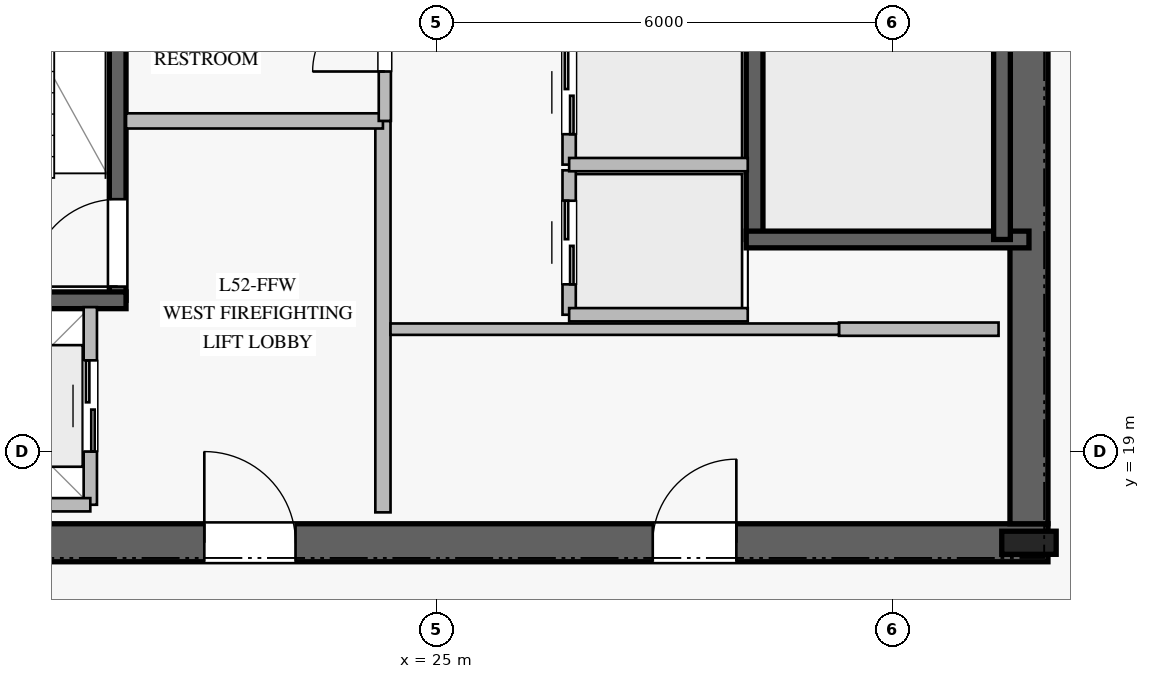
"""IFC4 building model, lengths in metres.
Left out: names, types, materials, properties, quantities, classifications, styles, units other than length and angle.
Written with IfcOpenShell. Run it as: python <this file> out.ifc"""

import sys

from ifc_helpers import new_model, si_unit, direction, frame, frame_2d, origin, origin_2d, place, context, subcontext, project, spatial, rectangle, i_section, extrude, element, fill, save


model = new_model("IFC4")
c1 = context("Model", 3, precision=1e-05, world=origin(), true_north=direction((0.0, 1.0)))
c2 = subcontext(c1, "Body", "Model", "MODEL_VIEW")
j1 = project(units=[si_unit("LENGTHUNIT", "METRE"), si_unit("PLANEANGLEUNIT", "RADIAN")], contexts=[c1])
p1 = place(None, origin())
s1 = spatial("IfcSite", under=j1, at=p1, CompositionType="ELEMENT")
p2 = place(p1, origin())
s2 = spatial("IfcBuilding", under=s1, at=p2, CompositionType="ELEMENT")
p3 = place(p2, frame((0.0, 0.0, 216.8)))
s3 = spatial("IfcBuildingStorey", under=s2, at=p3, CompositionType="ELEMENT", Elevation=216.8)
p4 = place(p3, frame((16.95, 17.8, 0.0), z_axis=(0.0, 0.0, 1.0), x_axis=(1.0, 0.0, 0.0)))
e1 = element("IfcWall", 1, at=p4, inside=s3, PredefinedType="SHEAR", context=c2, shape_type="SweptSolid", body=[
    extrude(rectangle(XDim=16.1, YDim=0.5, at=frame_2d((8.05, 0.0))), origin(), (0.0, 0.0, 1.0), 3.78),
])
p5 = place(p4, frame((5.0, 0.0, 0.0)))
e2 = element("IfcOpeningElement", 2, at=p5, cuts=e1, PredefinedType="OPENING", context=c2, shape_type="SweptSolid", body=[
    extrude(rectangle(XDim=1.2, YDim=2.25, at=frame_2d((0.6, 1.125))), frame((0.0, 0.26, 0.0), z_axis=(0.0, -1.0, 0.0), x_axis=(1.0, 0.0, 0.0)), (0.0, 0.0, 1.0), 0.52),
])
p6 = place(p4, frame((10.9, 0.0, 0.0)))
e3 = element("IfcOpeningElement", 3, at=p6, cuts=e1, PredefinedType="OPENING", context=c2, shape_type="SweptSolid", body=[
    extrude(rectangle(XDim=1.1, YDim=2.2, at=frame_2d((0.55, 1.1))), frame((0.0, 0.26, 0.0), z_axis=(0.0, -1.0, 0.0), x_axis=(1.0, 0.0, 0.0)), (0.0, 0.0, 1.0), 0.52),
])
p7 = place(p3, frame((32.8, 18.05, 0.0), z_axis=(0.0, 0.0, 1.0), x_axis=(0.0, 1.0, 0.0)))
e4 = element("IfcWall", 4, at=p7, inside=s3, PredefinedType="SHEAR", context=c2, shape_type="SweptSolid", body=[
    extrude(rectangle(XDim=13.9, YDim=0.5, at=frame_2d((6.95, 0.0))), origin(), (0.0, 0.0, 1.0), 3.78),
])
p8 = place(p3, frame((32.8, 17.8, 0.0), z_axis=(0.0, 0.0, 1.0), x_axis=(1.0, 0.0, 0.0)))
e5 = element("IfcColumn", 5, at=p8, inside=s3, PredefinedType="COLUMN", context=c2, shape_type="SweptSolid", body=[
    extrude(i_section(OverallWidth=0.304, OverallDepth=0.716, WebThickness=0.021, FlangeThickness=0.04, at=origin_2d()), origin(), (0.0, 0.0, 1.0), 4.0),
])
p9 = place(p3, frame((20.81, 20.99, 0.0), z_axis=(0.0, 0.0, 1.0), x_axis=(0.0, 1.0, 0.0)))
e6 = element("IfcWall", 6, at=p9, inside=s3, PredefinedType="SOLIDWALL", context=c2, shape_type="SweptSolid", body=[
    extrude(rectangle(XDim=7.22, YDim=0.22, at=frame_2d((3.61, 0.0))), origin(), (0.0, 0.0, 1.0), 3.78),
])
p10 = place(p9, frame((0.18, 0.0, 0.0)))
e7 = element("IfcOpeningElement", 7, at=p10, cuts=e6, PredefinedType="OPENING", context=c2, shape_type="SweptSolid", body=[
    extrude(rectangle(XDim=1.15, YDim=2.2, at=frame_2d((0.575, 1.1))), frame((0.0, 0.12, 0.0), z_axis=(0.0, -1.0, 0.0), x_axis=(1.0, 0.0, 0.0)), (0.0, 0.0, 1.0), 0.24),
])
p11 = place(p3, frame((17.2, 20.99, 0.0), z_axis=(0.0, 0.0, 1.0), x_axis=(1.0, 0.0, 0.0)))
e8 = element("IfcWall", 8, at=p11, inside=s3, PredefinedType="SOLIDWALL", context=c2, shape_type="SweptSolid", body=[
    extrude(rectangle(XDim=3.72, YDim=0.22, at=frame_2d((1.86, 0.0))), origin(), (0.0, 0.0, 1.0), 3.78),
])
p12 = place(p3, frame((29.19, 21.79, 0.0), z_axis=(0.0, 0.0, 1.0), x_axis=(0.0, 1.0, 0.0)))
e9 = element("IfcWall", 9, at=p12, inside=s3, PredefinedType="SOLIDWALL", context=c2, shape_type="SweptSolid", body=[
    extrude(rectangle(XDim=7.22, YDim=0.22, at=frame_2d((3.61, 0.0))), origin(), (0.0, 0.0, 1.0), 3.78),
])
p13 = place(p12, frame((5.88, 0.0, 0.0)))
e10 = element("IfcOpeningElement", 10, at=p13, cuts=e9, PredefinedType="OPENING", context=c2, shape_type="SweptSolid", body=[
    extrude(rectangle(XDim=1.15, YDim=2.2, at=frame_2d((0.575, 1.1))), frame((0.0, 0.12, 0.0), z_axis=(0.0, -1.0, 0.0), x_axis=(1.0, 0.0, 0.0)), (0.0, 0.0, 1.0), 0.24),
])
p14 = place(p3, frame((29.08, 21.79, 0.0), z_axis=(0.0, 0.0, 1.0), x_axis=(1.0, 0.0, 0.0)))
e11 = element("IfcWall", 11, at=p14, inside=s3, PredefinedType="SOLIDWALL", context=c2, shape_type="SweptSolid", body=[
    extrude(rectangle(XDim=3.72, YDim=0.22, at=frame_2d((1.86, 0.0))), origin(), (0.0, 0.0, 1.0), 3.78),
])
p15 = place(p3, frame((32.445, 29.01, 0.0), z_axis=(0.0, 0.0, 1.0), x_axis=(0.0, -1.0, 0.0)))
e12 = element("IfcWall", 12, at=p15, inside=s3, PredefinedType="SOLIDWALL", context=c2, shape_type="SweptSolid", body=[
    extrude(rectangle(XDim=7.22, YDim=0.22, at=frame_2d((3.61, 0.0))), origin(), (0.0, 0.0, 1.0), 3.78),
])
p16 = place(p3, frame((24.3, 18.2, 0.0), z_axis=(0.0, 0.0, 1.0), x_axis=(0.0, 1.0, 0.0)))
e13 = element("IfcWall", 13, at=p16, inside=s3, PredefinedType="PARTITIONING", context=c2, shape_type="SweptSolid", body=[
    extrude(rectangle(XDim=5.15, YDim=0.2, at=frame_2d((2.575, 0.0))), origin(), (0.0, 0.0, 1.0), 3.78),
])
p17 = place(p3, frame((20.92, 23.35, 0.0), z_axis=(0.0, 0.0, 1.0), x_axis=(1.0, 0.0, 0.0)))
e14 = element("IfcWall", 14, at=p17, inside=s3, PredefinedType="PARTITIONING", context=c2, shape_type="SweptSolid", body=[
    extrude(rectangle(XDim=3.38, YDim=0.2, at=frame_2d((1.69, 0.0))), origin(), (0.0, 0.0, 1.0), 3.78),
])
p18 = place(p3, frame((24.325, 23.35, 0.0), z_axis=(0.0, 0.0, 1.0), x_axis=(0.0, 1.0, 0.0)))
e15 = element("IfcWall", 15, at=p18, inside=s3, PredefinedType="PLUMBINGWALL", context=c2, shape_type="SweptSolid", body=[
    extrude(rectangle(XDim=4.93, YDim=0.16, at=frame_2d((2.465, 0.0))), origin(), (0.0, 0.0, 1.0), 3.78),
])
p19 = place(p18, frame((0.65, 0.0, 0.0)))
e16 = element("IfcOpeningElement", 16, at=p19, cuts=e15, PredefinedType="OPENING", context=c2, shape_type="SweptSolid", body=[
    extrude(rectangle(XDim=0.95, YDim=2.1, at=frame_2d((0.475, 1.05))), frame((0.0, 0.09, 0.0), z_axis=(0.0, -1.0, 0.0), x_axis=(1.0, 0.0, 0.0)), (0.0, 0.0, 1.0), 0.18),
])
p20 = place(p18, frame((3.11, 0.0, 0.0)))
e17 = element("IfcOpeningElement", 17, at=p20, cuts=e15, PredefinedType="OPENING", context=c2, shape_type="SweptSolid", body=[
    extrude(rectangle(XDim=0.9, YDim=2.1, at=frame_2d((0.45, 1.05))), frame((0.0, 0.09, 0.0), z_axis=(0.0, -1.0, 0.0), x_axis=(1.0, 0.0, 0.0)), (0.0, 0.0, 1.0), 0.18),
])
p21 = place(p3, frame((30.3, 20.61, 0.0), z_axis=(0.0, 0.0, 1.0), x_axis=(1.0, 0.0, 0.0)))
e18 = element("IfcWall", 18, at=p21, inside=s3, PredefinedType="PARTITIONING", context=c2, shape_type="SweptSolid", body=[
    extrude(rectangle(XDim=2.1, YDim=0.175, at=frame_2d((1.05, 0.0))), origin(), (0.0, 0.0, 1.0), 3.78),
])
p22 = place(p3, frame((24.4, 20.61, 0.0), z_axis=(0.0, 0.0, 1.0), x_axis=(1.0, 0.0, 0.0)))
e19 = element("IfcWall", 19, at=p22, inside=s3, PredefinedType="PARTITIONING", context=c2, shape_type="SweptSolid", body=[
    extrude(rectangle(XDim=5.9, YDim=0.15, at=frame_2d((2.95, 0.0))), origin(), (0.0, 0.0, 1.0), 3.78),
])
p23 = place(p3, frame((26.75, 20.8, 0.0), z_axis=(0.0, 0.0, 1.0), x_axis=(0.0, 1.0, 0.0)))
e20 = element("IfcWall", 20, at=p23, inside=s3, PredefinedType="PARTITIONING", context=c2, shape_type="SweptSolid", body=[
    extrude(rectangle(XDim=1.9, YDim=0.175, at=frame_2d((0.95, 0.0))), origin(), (0.0, 0.0, 1.0), 3.78),
])
p24 = place(p23, frame((0.4, 0.0, 0.0)))
e21 = element("IfcOpeningElement", 21, at=p24, cuts=e20, PredefinedType="OPENING", context=c2, shape_type="SweptSolid", body=[
    extrude(rectangle(XDim=1.1, YDim=2.2, at=frame_2d((0.55, 1.1))), frame((0.0, 0.098, 0.0), z_axis=(0.0, -1.0, 0.0), x_axis=(1.0, 0.0, 0.0)), (0.0, 0.0, 1.0), 0.195),
])
p25 = place(p3, frame((26.75, 20.8, 0.0), z_axis=(0.0, 0.0, 1.0), x_axis=(1.0, 0.0, 0.0)))
e22 = element("IfcWall", 22, at=p25, inside=s3, PredefinedType="PARTITIONING", context=c2, shape_type="SweptSolid", body=[
    extrude(rectangle(XDim=2.35, YDim=0.175, at=frame_2d((1.175, 0.0))), origin(), (0.0, 0.0, 1.0), 3.78),
])
p26 = place(p3, frame((26.75, 22.775, 0.0), z_axis=(0.0, 0.0, 1.0), x_axis=(0.0, 1.0, 0.0)))
e23 = element("IfcWall", 23, at=p26, inside=s3, PredefinedType="PARTITIONING", context=c2, shape_type="SweptSolid", body=[
    extrude(rectangle(XDim=1.9, YDim=0.175, at=frame_2d((0.95, 0.0))), origin(), (0.0, 0.0, 1.0), 3.78),
])
p27 = place(p26, frame((0.4, 0.0, 0.0)))
e24 = element("IfcOpeningElement", 24, at=p27, cuts=e23, PredefinedType="OPENING", context=c2, shape_type="SweptSolid", body=[
    extrude(rectangle(XDim=1.1, YDim=2.2, at=frame_2d((0.55, 1.1))), frame((0.0, 0.098, 0.0), z_axis=(0.0, -1.0, 0.0), x_axis=(1.0, 0.0, 0.0)), (0.0, 0.0, 1.0), 0.195),
])
p28 = place(p3, frame((26.75, 22.775, 0.0), z_axis=(0.0, 0.0, 1.0), x_axis=(1.0, 0.0, 0.0)))
e25 = element("IfcWall", 25, at=p28, inside=s3, PredefinedType="PARTITIONING", context=c2, shape_type="SweptSolid", body=[
    extrude(rectangle(XDim=2.35, YDim=0.175, at=frame_2d((1.175, 0.0))), origin(), (0.0, 0.0, 1.0), 3.78),
])
p29 = place(p3, frame((20.45, 18.3, 0.0), z_axis=(0.0, 0.0, 1.0), x_axis=(0.0, 1.0, 0.0)))
e26 = element("IfcWall", 26, at=p29, inside=s3, PredefinedType="PARTITIONING", context=c2, shape_type="SweptSolid", body=[
    extrude(rectangle(XDim=2.6, YDim=0.175, at=frame_2d((1.3, 0.0))), origin(), (0.0, 0.0, 1.0), 3.78),
])
p30 = place(p29, frame((0.7, 0.0, 0.0)))
e27 = element("IfcOpeningElement", 27, at=p30, cuts=e26, PredefinedType="OPENING", context=c2, shape_type="SweptSolid", body=[
    extrude(rectangle(XDim=1.2, YDim=2.2, at=frame_2d((0.6, 1.1))), frame((0.0, 0.098, 0.0), z_axis=(0.0, -1.0, 0.0), x_axis=(1.0, 0.0, 0.0)), (0.0, 0.0, 1.0), 0.195),
])
p31 = place(p3, frame((17.85, 18.3, 0.0), z_axis=(0.0, 0.0, 1.0), x_axis=(1.0, 0.0, 0.0)))
e28 = element("IfcWall", 28, at=p31, inside=s3, PredefinedType="PARTITIONING", context=c2, shape_type="SweptSolid", body=[
    extrude(rectangle(XDim=2.6, YDim=0.175, at=frame_2d((1.3, 0.0))), origin(), (0.0, 0.0, 1.0), 3.78),
])
p32 = place(p10, origin())
e29 = element("IfcDoor", 29, at=p32, inside=s3, OperationType="SINGLE_SWING_LEFT", PredefinedType="DOOR", context=c2, shape_type="SweptSolid", body=[
    extrude(rectangle(XDim=1.15, YDim=2.2, at=frame_2d((0.575, 1.1))), frame((0.0, 0.025, 0.0), z_axis=(0.0, -1.0, 0.0), x_axis=(1.0, 0.0, 0.0)), (0.0, 0.0, 1.0), 0.05),
])
fill(e7, e29)
p33 = place(p5, origin())
e30 = element("IfcDoor", 30, at=p33, inside=s3, OperationType="SINGLE_SWING_LEFT", PredefinedType="DOOR", context=c2, shape_type="SweptSolid", body=[
    extrude(rectangle(XDim=1.2, YDim=2.25, at=frame_2d((0.6, 1.125))), frame((0.0, 0.025, 0.0), z_axis=(0.0, -1.0, 0.0), x_axis=(1.0, 0.0, 0.0)), (0.0, 0.0, 1.0), 0.05),
])
fill(e2, e30)
p34 = place(p19, origin())
e31 = element("IfcDoor", 31, at=p34, inside=s3, OperationType="SINGLE_SWING_LEFT", PredefinedType="DOOR", context=c2, shape_type="SweptSolid", body=[
    extrude(rectangle(XDim=0.95, YDim=2.1, at=frame_2d((0.475, 1.05))), frame((0.0, 0.025, 0.0), z_axis=(0.0, -1.0, 0.0), x_axis=(1.0, 0.0, 0.0)), (0.0, 0.0, 1.0), 0.05),
])
fill(e16, e31)
p35 = place(p6, origin())
e32 = element("IfcDoor", 32, at=p35, inside=s3, OperationType="SINGLE_SWING_RIGHT", PredefinedType="DOOR", context=c2, shape_type="SweptSolid", body=[
    extrude(rectangle(XDim=1.1, YDim=2.2, at=frame_2d((0.55, 1.1))), frame((0.0, 0.025, 0.0), z_axis=(0.0, -1.0, 0.0), x_axis=(1.0, 0.0, 0.0)), (0.0, 0.0, 1.0), 0.05),
])
fill(e3, e32)
p36 = place(p24, origin())
e33 = element("IfcDoor", 33, at=p36, inside=s3, OperationType="DOUBLE_DOOR_SLIDING", PredefinedType="DOOR", context=c2, shape_type="SweptSolid", body=[
    extrude(rectangle(XDim=1.1, YDim=2.2, at=frame_2d((0.55, 1.1))), frame((0.0, 0.025, 0.0), z_axis=(0.0, -1.0, 0.0), x_axis=(1.0, 0.0, 0.0)), (0.0, 0.0, 1.0), 0.05),
])
fill(e21, e33)
p37 = place(p27, origin())
e34 = element("IfcDoor", 34, at=p37, inside=s3, OperationType="DOUBLE_DOOR_SLIDING", PredefinedType="DOOR", context=c2, shape_type="SweptSolid", body=[
    extrude(rectangle(XDim=1.1, YDim=2.2, at=frame_2d((0.55, 1.1))), frame((0.0, 0.025, 0.0), z_axis=(0.0, -1.0, 0.0), x_axis=(1.0, 0.0, 0.0)), (0.0, 0.0, 1.0), 0.05),
])
fill(e24, e34)
p38 = place(p30, origin())
e35 = element("IfcDoor", 35, at=p38, inside=s3, OperationType="DOUBLE_DOOR_SLIDING", PredefinedType="DOOR", context=c2, shape_type="SweptSolid", body=[
    extrude(rectangle(XDim=1.2, YDim=2.2, at=frame_2d((0.6, 1.1))), frame((0.0, 0.025, 0.0), z_axis=(0.0, -1.0, 0.0), x_axis=(1.0, 0.0, 0.0)), (0.0, 0.0, 1.0), 0.05),
])
fill(e27, e35)
save(model, sys.argv[1])
